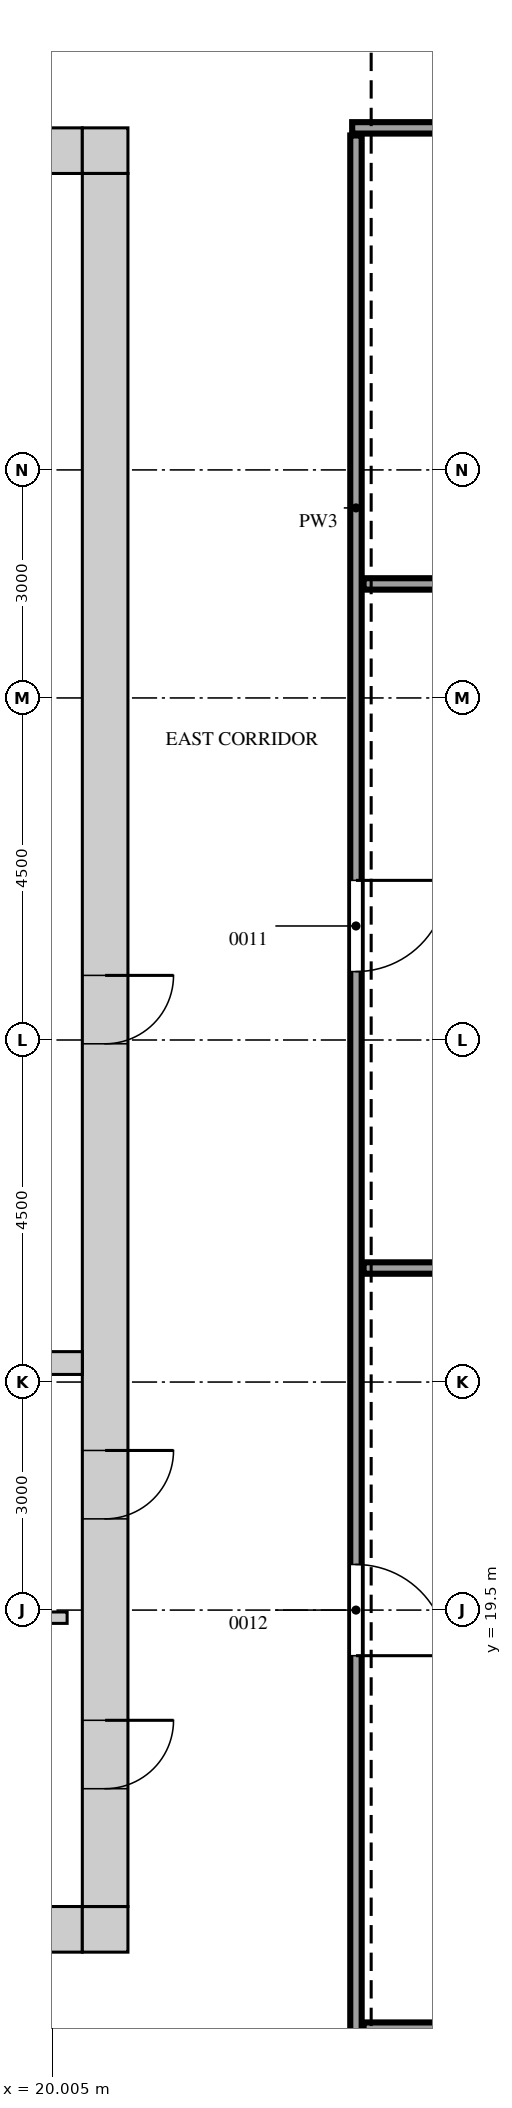
"""IFC4 building model, lengths in metres.
Left out: names, types, materials, properties, quantities, classifications, styles, units other than length and angle.
Written with IfcOpenShell. Run it as: python <this file> out.ifc"""

import sys

from ifc_helpers import new_model, si_unit, direction, frame, frame_2d, origin, place, context, subcontext, project, spatial, rectangle, extrude, source, transform, mapped, element, fill, save


model = new_model("IFC4")
c1 = context("Model", 3, precision=1e-05, world=origin(), true_north=direction((0.0, 1.0)))
c2 = subcontext(c1, "Body", "Model", "MODEL_VIEW")
j1 = project(units=[si_unit("LENGTHUNIT", "METRE"), si_unit("PLANEANGLEUNIT", "RADIAN")], contexts=[c1])
p1 = place(None, origin())
s1 = spatial("IfcSite", under=j1, at=p1, CompositionType="ELEMENT")
p2 = place(p1, origin())
s2 = spatial("IfcBuilding", under=s1, at=p2, CompositionType="ELEMENT")
p3 = place(p2, frame((0.0, 0.0, 330.2)))
s3 = spatial("IfcBuildingStorey", under=s2, at=p3, CompositionType="ELEMENT", Elevation=330.2)
m1 = source(origin(), c2, "Body", "SweptSolid", [
    extrude(rectangle(XDim=14.4, YDim=0.6, at=frame_2d((7.2, 0.0))), origin(), (0.0, 0.0, 1.0), 4.25),
])
p4 = place(p3, frame((6.0, 38.7, 0.0), z_axis=(0.0, 0.0, 1.0), x_axis=(1.0, 0.0, 0.0)))
e1 = element("IfcWall", 1, at=p4, inside=s3, PredefinedType="SHEAR", context=c2, shape_type="MappedRepresentation", body=[
    mapped(m1, transform((0.0, 0.0, 0.0))),
])
m2 = source(origin(), c2, "Body", "SweptSolid", [
    extrude(rectangle(XDim=0.9, YDim=2.1, at=frame_2d((0.45, 1.05))), frame((0.0, 0.31, 0.0), z_axis=(0.0, -1.0, 0.0), x_axis=(1.0, 0.0, 0.0)), (0.0, 0.0, 1.0), 0.62),
])
p5 = place(p4, frame((3.7, 0.0, 0.0)))
e2 = element("IfcOpeningElement", 2, at=p5, cuts=e1, PredefinedType="OPENING", context=c2, shape_type="MappedRepresentation", body=[
    mapped(m2, transform((0.0, 0.0, 0.0))),
])
p6 = place(p4, frame((10.4, 0.0, 0.0)))
e3 = element("IfcOpeningElement", 3, at=p6, cuts=e1, PredefinedType="OPENING", context=c2, shape_type="MappedRepresentation", body=[
    mapped(m2, transform((0.0, 0.0, 0.0))),
])
m3 = source(origin(), c2, "Body", "SweptSolid", [
    extrude(rectangle(XDim=0.6, YDim=0.6, at=frame_2d((0.3, 0.0))), origin(), (0.0, 0.0, 1.0), 4.25),
])
p7 = place(p3, frame((20.4, 38.7, 0.0), z_axis=(0.0, 0.0, 1.0), x_axis=(1.0, 0.0, 0.0)))
e4 = element("IfcWall", 4, at=p7, inside=s3, PredefinedType="SHEAR", context=c2, shape_type="MappedRepresentation", body=[
    mapped(m3, transform((0.0, 0.0, 0.0))),
])
p8 = place(p3, frame((6.0, 15.3, 0.0), z_axis=(0.0, 0.0, 1.0), x_axis=(1.0, 0.0, 0.0)))
e5 = element("IfcWall", 5, at=p8, inside=s3, PredefinedType="SHEAR", context=c2, shape_type="MappedRepresentation", body=[
    mapped(m1, transform((0.0, 0.0, 0.0))),
])
m4 = source(origin(), c2, "Body", "SweptSolid", [
    extrude(rectangle(XDim=1.2, YDim=2.1, at=frame_2d((0.6, 1.05))), frame((0.0, 0.31, 0.0), z_axis=(0.0, -1.0, 0.0), x_axis=(1.0, 0.0, 0.0)), (0.0, 0.0, 1.0), 0.62),
])
p9 = place(p8, frame((6.2, 0.0, 0.0)))
e6 = element("IfcOpeningElement", 6, at=p9, cuts=e5, PredefinedType="OPENING", context=c2, shape_type="MappedRepresentation", body=[
    mapped(m4, transform((0.0, 0.0, 0.0))),
])
p10 = place(p8, frame((2.85, 0.0, 0.0)))
e7 = element("IfcOpeningElement", 7, at=p10, cuts=e5, PredefinedType="OPENING", context=c2, shape_type="MappedRepresentation", body=[
    mapped(m4, transform((0.0, 0.0, 0.0))),
])
m5 = source(origin(), c2, "Body", "SweptSolid", [
    extrude(rectangle(XDim=1.0, YDim=2.1, at=frame_2d((0.5, 1.05))), frame((0.0, 0.31, 0.0), z_axis=(0.0, -1.0, 0.0), x_axis=(1.0, 0.0, 0.0)), (0.0, 0.0, 1.0), 0.62),
])
p11 = place(p8, frame((8.7, 0.0, 0.0)))
e8 = element("IfcOpeningElement", 8, at=p11, cuts=e5, PredefinedType="OPENING", context=c2, shape_type="MappedRepresentation", body=[
    mapped(m5, transform((0.0, 0.0, 0.0))),
])
p12 = place(p3, frame((20.4, 15.3, 0.0), z_axis=(0.0, 0.0, 1.0), x_axis=(1.0, 0.0, 0.0)))
e9 = element("IfcWall", 9, at=p12, inside=s3, PredefinedType="SHEAR", context=c2, shape_type="MappedRepresentation", body=[
    mapped(m3, transform((0.0, 0.0, 0.0))),
])
m6 = source(origin(), c2, "Body", "SweptSolid", [
    extrude(rectangle(XDim=22.8, YDim=0.6, at=frame_2d((11.4, 0.0))), origin(), (0.0, 0.0, 1.0), 4.25),
])
p13 = place(p3, frame((20.7, 15.6, 0.0), z_axis=(0.0, 0.0, 1.0), x_axis=(0.0, 1.0, 0.0)))
e10 = element("IfcWall", 10, at=p13, inside=s3, PredefinedType="SHEAR", context=c2, shape_type="MappedRepresentation", body=[
    mapped(m6, transform((0.0, 0.0, 0.0))),
])
p14 = place(p13, frame((11.35, 0.0, 0.0)))
e11 = element("IfcOpeningElement", 11, at=p14, cuts=e10, PredefinedType="OPENING", context=c2, shape_type="MappedRepresentation", body=[
    mapped(m2, transform((0.0, 0.0, 0.0))),
])
p15 = place(p13, frame((1.55, 0.0, 0.0)))
e12 = element("IfcOpeningElement", 12, at=p15, cuts=e10, PredefinedType="OPENING", context=c2, shape_type="MappedRepresentation", body=[
    mapped(m2, transform((0.0, 0.0, 0.0))),
])
p16 = place(p13, frame((5.1, 0.0, 0.0)))
e13 = element("IfcOpeningElement", 13, at=p16, cuts=e10, PredefinedType="OPENING", context=c2, shape_type="MappedRepresentation", body=[
    mapped(m2, transform((0.0, 0.0, 0.0))),
])
m7 = source(origin(), c2, "Body", "SweptSolid", [
    extrude(rectangle(XDim=13.2, YDim=0.3, at=frame_2d((6.6, 0.0))), origin(), (0.0, 0.0, 1.0), 4.25),
])
p17 = place(p3, frame((7.2, 22.75, 0.0), z_axis=(0.0, 0.0, 1.0), x_axis=(1.0, 0.0, 0.0)))
e14 = element("IfcWall", 14, at=p17, inside=s3, PredefinedType="STANDARD", context=c2, shape_type="MappedRepresentation", body=[
    mapped(m7, transform((0.0, 0.0, 0.0))),
])
m8 = source(origin(), c2, "Body", "SweptSolid", [
    extrude(rectangle(XDim=32.6, YDim=0.15, at=frame_2d((16.3, 0.0))), origin(), (0.0, 0.0, 1.0), 4.3),
])
p18 = place(p3, frame((24.0, 6.3, 0.0), z_axis=(0.0, 0.0, 1.0), x_axis=(0.0, 1.0, 0.0)))
e15 = element("IfcWall", 15, at=p18, inside=s3, PredefinedType="PARTITIONING", context=c2, shape_type="MappedRepresentation", body=[
    mapped(m8, transform((0.0, 0.0, 0.0))),
])
m9 = source(origin(), c2, "Body", "SweptSolid", [
    extrude(rectangle(XDim=1.2, YDim=2.1, at=frame_2d((0.6, 1.05))), frame((0.0, 0.085, 0.0), z_axis=(0.0, -1.0, 0.0), x_axis=(1.0, 0.0, 0.0)), (0.0, 0.0, 1.0), 0.17),
])
p19 = place(p18, frame((3.1, 0.0, 0.0)))
e16 = element("IfcOpeningElement", 16, at=p19, cuts=e15, PredefinedType="OPENING", context=c2, shape_type="MappedRepresentation", body=[
    mapped(m9, transform((0.0, 0.0, 0.0))),
])
p20 = place(p18, frame((12.6, 0.0, 0.0)))
e17 = element("IfcOpeningElement", 17, at=p20, cuts=e15, PredefinedType="OPENING", context=c2, shape_type="MappedRepresentation", body=[
    mapped(m9, transform((0.0, 0.0, 0.0))),
])
p21 = place(p18, frame((21.6, 0.0, 0.0)))
e18 = element("IfcOpeningElement", 18, at=p21, cuts=e15, PredefinedType="OPENING", context=c2, shape_type="MappedRepresentation", body=[
    mapped(m9, transform((0.0, 0.0, 0.0))),
])
m10 = source(origin(), c2, "Body", "SweptSolid", [
    extrude(rectangle(XDim=23.6, YDim=0.15, at=frame_2d((11.8, 0.0))), origin(), (0.0, 0.0, 1.0), 4.3),
])
p22 = place(p3, frame((24.1, 14.0, 0.0), z_axis=(0.0, 0.0, 1.0), x_axis=(1.0, 0.0, 0.0)))
e19 = element("IfcWall", 19, at=p22, inside=s3, PredefinedType="PARTITIONING", context=c2, shape_type="MappedRepresentation", body=[
    mapped(m10, transform((0.0, 0.0, 0.0))),
])
m11 = source(origin(), c2, "Body", "SweptSolid", [
    extrude(rectangle(XDim=4.1, YDim=0.15, at=frame_2d((2.05, 0.0))), origin(), (0.0, 0.0, 1.0), 4.3),
])
p23 = place(p3, frame((16.1, 19.4, 0.0), z_axis=(0.0, 0.0, 1.0), x_axis=(1.0, 0.0, 0.0)))
e20 = element("IfcWall", 20, at=p23, inside=s3, PredefinedType="PARTITIONING", context=c2, shape_type="MappedRepresentation", body=[
    mapped(m11, transform((0.0, 0.0, 0.0))),
])
for number, where, z_axis, x_axis in (
    (21, (24.1, 24.0, 0.0), (0.0, 0.0, 1.0), (1.0, 0.0, 0.0)),
    (22, (24.1, 33.0, 0.0), (0.0, 0.0, 1.0), (1.0, 0.0, 0.0)),
):
    element("IfcWall", number, at=place(p3, frame(where, z_axis=z_axis, x_axis=x_axis)), inside=s3, PredefinedType="PARTITIONING", context=c2, shape_type="MappedRepresentation", body=[
        mapped(m10, transform((0.0, 0.0, 0.0))),
    ])
m12 = source(origin(), c2, "Body", "SweptSolid", [
    extrude(rectangle(XDim=23.75, YDim=0.15, at=frame_2d((11.875, 0.0))), origin(), (0.0, 0.0, 1.0), 4.3),
])
p24 = place(p3, frame((23.95, 39.0, 0.0), z_axis=(0.0, 0.0, 1.0), x_axis=(1.0, 0.0, 0.0)))
e23 = element("IfcWall", 23, at=p24, inside=s3, PredefinedType="PARTITIONING", context=c2, shape_type="MappedRepresentation", body=[
    mapped(m12, transform((0.0, 0.0, 0.0))),
])
p25 = place(p24, frame((2.8, 0.0, 0.0)))
e24 = element("IfcOpeningElement", 24, at=p25, cuts=e23, PredefinedType="OPENING", context=c2, shape_type="MappedRepresentation", body=[
    mapped(m9, transform((0.0, 0.0, 0.0))),
])
m13 = source(origin(), c2, "Body", "SweptSolid", [
    extrude(rectangle(XDim=0.9, YDim=2.1, at=frame_2d((0.45, 1.05))), frame((0.0, 0.25, 0.0), z_axis=(0.0, -1.0, 0.0), x_axis=(1.0, 0.0, 0.0)), (0.0, 0.0, 1.0), 0.5),
])
p26 = place(p14, origin())
e25 = element("IfcDoor", 25, at=p26, inside=s3, OperationType="SINGLE_SWING_RIGHT", PredefinedType="DOOR", context=c2, shape_type="MappedRepresentation", body=[
    mapped(m13, transform((0.0, 0.0, 0.0))),
])
fill(e11, e25)
m14 = source(origin(), c2, "Body", "SweptSolid", [
    extrude(rectangle(XDim=1.2, YDim=2.1, at=frame_2d((0.6, 1.05))), frame((0.0, 0.025, 0.0), z_axis=(0.0, -1.0, 0.0), x_axis=(1.0, 0.0, 0.0)), (0.0, 0.0, 1.0), 0.05),
])
p27 = place(p20, origin())
e26 = element("IfcDoor", 26, at=p27, inside=s3, OperationType="SINGLE_SWING_LEFT", PredefinedType="DOOR", context=c2, shape_type="MappedRepresentation", body=[
    mapped(m14, transform((0.0, 0.0, 0.0))),
])
fill(e17, e26)
p28 = place(p21, origin())
e27 = element("IfcDoor", 27, at=p28, inside=s3, OperationType="SINGLE_SWING_RIGHT", PredefinedType="DOOR", context=c2, shape_type="MappedRepresentation", body=[
    mapped(m14, transform((0.0, 0.0, 0.0))),
])
fill(e18, e27)
p29 = place(p15, origin())
e28 = element("IfcDoor", 28, at=p29, inside=s3, OperationType="SINGLE_SWING_RIGHT", PredefinedType="DOOR", context=c2, shape_type="MappedRepresentation", body=[
    mapped(m13, transform((0.0, 0.0, 0.0))),
])
fill(e12, e28)
p30 = place(p16, origin())
e29 = element("IfcDoor", 29, at=p30, inside=s3, OperationType="SINGLE_SWING_RIGHT", PredefinedType="DOOR", context=c2, shape_type="MappedRepresentation", body=[
    mapped(m13, transform((0.0, 0.0, 0.0))),
])
fill(e13, e29)
save(model, sys.argv[1])
